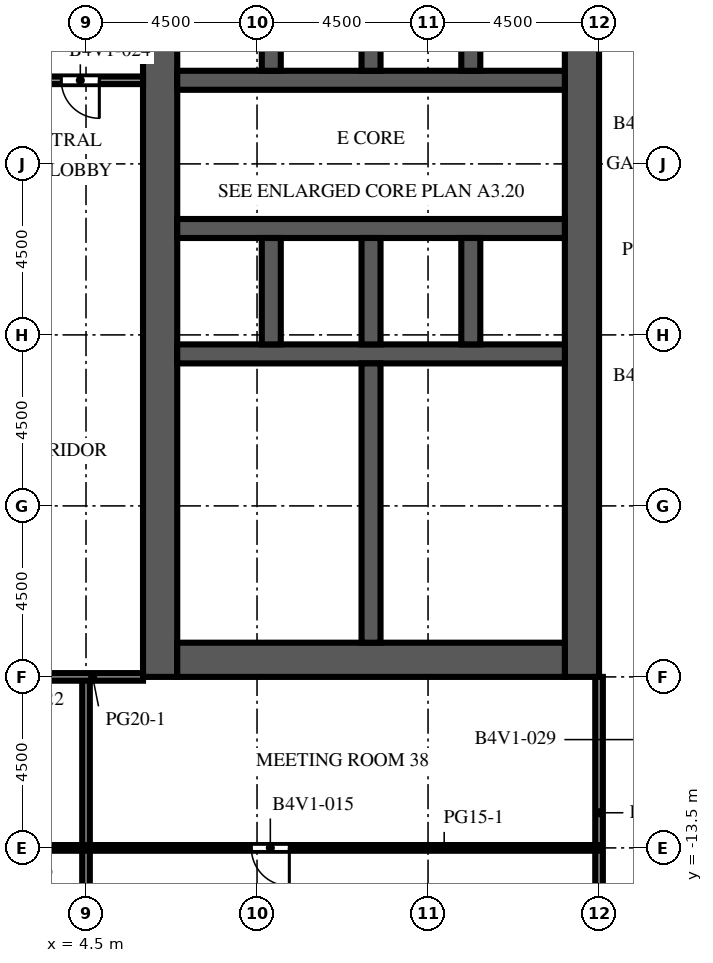
"""IFC4 building model, lengths in metres.
Left out: names, types, materials, properties, quantities, classifications, styles, units other than length and angle.
Written with IfcOpenShell. Run it as: python <this file> out.ifc"""

import sys

from ifc_helpers import new_model, si_unit, direction, frame, frame_2d, origin, place, context, subcontext, project, spatial, rectangle, extrude, element, fill, save


model = new_model("IFC4")
c1 = context("Model", 3, precision=1e-05, world=origin(), true_north=direction((0.0, 1.0)))
c2 = subcontext(c1, "Body", "Model", "MODEL_VIEW")
j1 = project(units=[si_unit("LENGTHUNIT", "METRE"), si_unit("PLANEANGLEUNIT", "RADIAN")], contexts=[c1])
p1 = place(None, origin())
s1 = spatial("IfcSite", under=j1, at=p1, CompositionType="ELEMENT")
p2 = place(p1, origin())
s2 = spatial("IfcBuilding", under=s1, at=p2, CompositionType="ELEMENT")
p3 = place(p2, frame((0.0, 0.0, 133.1)))
s3 = spatial("IfcBuildingStorey", under=s2, at=p3, CompositionType="ELEMENT", Elevation=133.1)
p4 = place(p3, frame((6.45, -9.0, 0.0), z_axis=(0.0, 0.0, 1.0), x_axis=(0.0, 1.0, 0.0)))
e1 = element("IfcWall", 1, at=p4, inside=s3, PredefinedType="SHEAR", context=c2, shape_type="SweptSolid", body=[
    extrude(rectangle(XDim=27.5, YDim=0.9, at=frame_2d((13.75, 0.0))), origin(), (0.0, 0.0, 1.0), 4.1),
])
p5 = place(p4, frame((12.55, 0.0, 0.0)))
e2 = element("IfcOpeningElement", 2, at=p5, cuts=e1, PredefinedType="OPENING", context=c2, shape_type="SweptSolid", body=[
    extrude(rectangle(XDim=2.4, YDim=2.4, at=frame_2d((1.2, 1.2))), frame((0.0, 0.46, 0.0), z_axis=(0.0, -1.0, 0.0), x_axis=(1.0, 0.0, 0.0)), (0.0, 0.0, 1.0), 0.92),
])
p6 = place(p4, frame((3.975, 0.0, 0.0)))
e3 = element("IfcOpeningElement", 3, at=p6, cuts=e1, PredefinedType="OPENING", context=c2, shape_type="SweptSolid", body=[
    extrude(rectangle(XDim=1.2, YDim=2.1, at=frame_2d((0.6, 1.05))), frame((0.0, 0.46, 0.0), z_axis=(0.0, -1.0, 0.0), x_axis=(1.0, 0.0, 0.0)), (0.0, 0.0, 1.0), 0.92),
])
p7 = place(p4, frame((22.325, 0.0, 0.0)))
e4 = element("IfcOpeningElement", 4, at=p7, cuts=e1, PredefinedType="OPENING", context=c2, shape_type="SweptSolid", body=[
    extrude(rectangle(XDim=1.2, YDim=2.1, at=frame_2d((0.6, 1.05))), frame((0.0, 0.46, 0.0), z_axis=(0.0, -1.0, 0.0), x_axis=(1.0, 0.0, 0.0)), (0.0, 0.0, 1.0), 0.92),
])
p8 = place(p3, frame((17.55, -9.0, 0.0), z_axis=(0.0, 0.0, 1.0), x_axis=(0.0, 1.0, 0.0)))
e5 = element("IfcWall", 5, at=p8, inside=s3, PredefinedType="SHEAR", context=c2, shape_type="SweptSolid", body=[
    extrude(rectangle(XDim=27.5, YDim=0.9, at=frame_2d((13.75, 0.0))), origin(), (0.0, 0.0, 1.0), 4.1),
])
p9 = place(p8, frame((12.55, 0.0, 0.0)))
e6 = element("IfcOpeningElement", 6, at=p9, cuts=e5, PredefinedType="OPENING", context=c2, shape_type="SweptSolid", body=[
    extrude(rectangle(XDim=2.4, YDim=2.4, at=frame_2d((1.2, 1.2))), frame((0.0, 0.46, 0.0), z_axis=(0.0, -1.0, 0.0), x_axis=(1.0, 0.0, 0.0)), (0.0, 0.0, 1.0), 0.92),
])
p10 = place(p8, frame((6.825, 0.0, 0.0)))
e7 = element("IfcOpeningElement", 7, at=p10, cuts=e5, PredefinedType="OPENING", context=c2, shape_type="SweptSolid", body=[
    extrude(rectangle(XDim=1.2, YDim=2.1, at=frame_2d((0.6, 1.05))), frame((0.0, 0.46, 0.0), z_axis=(0.0, -1.0, 0.0), x_axis=(1.0, 0.0, 0.0)), (0.0, 0.0, 1.0), 0.92),
])
p11 = place(p8, frame((19.475, 0.0, 0.0)))
e8 = element("IfcOpeningElement", 8, at=p11, cuts=e5, PredefinedType="OPENING", context=c2, shape_type="SweptSolid", body=[
    extrude(rectangle(XDim=1.2, YDim=2.1, at=frame_2d((0.6, 1.05))), frame((0.0, 0.46, 0.0), z_axis=(0.0, -1.0, 0.0), x_axis=(1.0, 0.0, 0.0)), (0.0, 0.0, 1.0), 0.92),
])
p12 = place(p3, frame((6.9, -8.55, 0.0), z_axis=(0.0, 0.0, 1.0), x_axis=(1.0, 0.0, 0.0)))
e9 = element("IfcWall", 9, at=p12, inside=s3, PredefinedType="SHEAR", context=c2, shape_type="SweptSolid", body=[
    extrude(rectangle(XDim=10.2, YDim=0.9, at=frame_2d((5.1, 0.0))), origin(), (0.0, 0.0, 1.0), 4.1),
])
p13 = place(p3, frame((6.9, -0.5, 0.0), z_axis=(0.0, 0.0, 1.0), x_axis=(1.0, 0.0, 0.0)))
e10 = element("IfcWall", 10, at=p13, inside=s3, PredefinedType="SHEAR", context=c2, shape_type="SweptSolid", body=[
    extrude(rectangle(XDim=10.2, YDim=0.5, at=frame_2d((5.1, 0.0))), origin(), (0.0, 0.0, 1.0), 4.1),
])
p14 = place(p3, frame((6.9, 2.8, 0.0), z_axis=(0.0, 0.0, 1.0), x_axis=(1.0, 0.0, 0.0)))
e11 = element("IfcWall", 11, at=p14, inside=s3, PredefinedType="SHEAR", context=c2, shape_type="SweptSolid", body=[
    extrude(rectangle(XDim=10.2, YDim=0.5, at=frame_2d((5.1, 0.0))), origin(), (0.0, 0.0, 1.0), 4.1),
])
p15 = place(p14, frame((0.562, 0.0, 0.0)))
e12 = element("IfcOpeningElement", 12, at=p15, cuts=e11, PredefinedType="OPENING", context=c2, shape_type="SweptSolid", body=[
    extrude(rectangle(XDim=1.1, YDim=2.1, at=frame_2d((0.55, 1.05))), frame((0.0, 0.26, 0.0), z_axis=(0.0, -1.0, 0.0), x_axis=(1.0, 0.0, 0.0)), (0.0, 0.0, 1.0), 0.52),
])
p16 = place(p14, frame((3.238, 0.0, 0.0)))
e13 = element("IfcOpeningElement", 13, at=p16, cuts=e11, PredefinedType="OPENING", context=c2, shape_type="SweptSolid", body=[
    extrude(rectangle(XDim=1.1, YDim=2.1, at=frame_2d((0.55, 1.05))), frame((0.0, 0.26, 0.0), z_axis=(0.0, -1.0, 0.0), x_axis=(1.0, 0.0, 0.0)), (0.0, 0.0, 1.0), 0.52),
])
p17 = place(p14, frame((8.538, 0.0, 0.0)))
e14 = element("IfcOpeningElement", 14, at=p17, cuts=e11, PredefinedType="OPENING", context=c2, shape_type="SweptSolid", body=[
    extrude(rectangle(XDim=1.1, YDim=2.1, at=frame_2d((0.55, 1.05))), frame((0.0, 0.26, 0.0), z_axis=(0.0, -1.0, 0.0), x_axis=(1.0, 0.0, 0.0)), (0.0, 0.0, 1.0), 0.52),
])
p18 = place(p3, frame((6.9, 6.7, 0.0), z_axis=(0.0, 0.0, 1.0), x_axis=(1.0, 0.0, 0.0)))
e15 = element("IfcWall", 15, at=p18, inside=s3, PredefinedType="SHEAR", context=c2, shape_type="SweptSolid", body=[
    extrude(rectangle(XDim=10.2, YDim=0.5, at=frame_2d((5.1, 0.0))), origin(), (0.0, 0.0, 1.0), 4.1),
])
p19 = place(p18, frame((0.562, 0.0, 0.0)))
e16 = element("IfcOpeningElement", 16, at=p19, cuts=e15, PredefinedType="OPENING", context=c2, shape_type="SweptSolid", body=[
    extrude(rectangle(XDim=1.1, YDim=2.1, at=frame_2d((0.55, 1.05))), frame((0.0, 0.26, 0.0), z_axis=(0.0, -1.0, 0.0), x_axis=(1.0, 0.0, 0.0)), (0.0, 0.0, 1.0), 0.52),
])
p20 = place(p18, frame((3.288, 0.0, 0.0)))
e17 = element("IfcOpeningElement", 17, at=p20, cuts=e15, PredefinedType="OPENING", context=c2, shape_type="SweptSolid", body=[
    extrude(rectangle(XDim=1.0, YDim=2.1, at=frame_2d((0.5, 1.05))), frame((0.0, 0.26, 0.0), z_axis=(0.0, -1.0, 0.0), x_axis=(1.0, 0.0, 0.0)), (0.0, 0.0, 1.0), 0.52),
])
p21 = place(p18, frame((5.913, 0.0, 0.0)))
e18 = element("IfcOpeningElement", 18, at=p21, cuts=e15, PredefinedType="OPENING", context=c2, shape_type="SweptSolid", body=[
    extrude(rectangle(XDim=1.0, YDim=2.1, at=frame_2d((0.5, 1.05))), frame((0.0, 0.26, 0.0), z_axis=(0.0, -1.0, 0.0), x_axis=(1.0, 0.0, 0.0)), (0.0, 0.0, 1.0), 0.52),
])
p22 = place(p18, frame((8.587, 0.0, 0.0)))
e19 = element("IfcOpeningElement", 19, at=p22, cuts=e15, PredefinedType="OPENING", context=c2, shape_type="SweptSolid", body=[
    extrude(rectangle(XDim=1.0, YDim=2.1, at=frame_2d((0.5, 1.05))), frame((0.0, 0.26, 0.0), z_axis=(0.0, -1.0, 0.0), x_axis=(1.0, 0.0, 0.0)), (0.0, 0.0, 1.0), 0.52),
])
for number, where, z_axis, x_axis in (
    (20, (9.375, -0.25, 0.0), (0.0, 0.0, 1.0), (0.0, 1.0, 0.0)),
    (21, (9.375, 6.95, 0.0), (0.0, 0.0, 1.0), (0.0, 1.0, 0.0)),
    (22, (12.0, -0.25, 0.0), (0.0, 0.0, 1.0), (0.0, 1.0, 0.0)),
    (23, (12.0, 6.95, 0.0), (0.0, 0.0, 1.0), (0.0, 1.0, 0.0)),
    (24, (14.625, -0.25, 0.0), (0.0, 0.0, 1.0), (0.0, 1.0, 0.0)),
    (25, (14.625, 6.95, 0.0), (0.0, 0.0, 1.0), (0.0, 1.0, 0.0)),
):
    element("IfcWall", number, at=place(p3, frame(where, z_axis=z_axis, x_axis=x_axis)), inside=s3, PredefinedType="SHEAR", context=c2, shape_type="SweptSolid", body=[
        extrude(rectangle(XDim=2.8, YDim=0.5, at=frame_2d((1.4, 0.0))), origin(), (0.0, 0.0, 1.0), 4.1),
    ])
p23 = place(p3, frame((12.0, -8.1, 0.0), z_axis=(0.0, 0.0, 1.0), x_axis=(0.0, 1.0, 0.0)))
e26 = element("IfcWall", 26, at=p23, inside=s3, PredefinedType="SHEAR", context=c2, shape_type="SweptSolid", body=[
    extrude(rectangle(XDim=7.35, YDim=0.5, at=frame_2d((3.675, 0.0))), origin(), (0.0, 0.0, 1.0), 4.1),
])
p24 = place(p3, frame((8.4, -8.1, 0.0), z_axis=(0.0, 0.0, 1.0), x_axis=(0.0, 1.0, 0.0)))
e27 = element("IfcWall", 27, at=p24, inside=s3, PredefinedType="PARTITIONING", context=c2, shape_type="SweptSolid", body=[
    extrude(rectangle(XDim=2.205, YDim=0.1, at=frame_2d((1.103, 0.0))), origin(), (0.0, 0.0, 1.0), 3.65),
])
p25 = place(p24, frame((0.603, 0.0, 0.0)))
e28 = element("IfcOpeningElement", 28, at=p25, cuts=e27, PredefinedType="OPENING", context=c2, shape_type="SweptSolid", body=[
    extrude(rectangle(XDim=1.0, YDim=2.1, at=frame_2d((0.5, 1.05))), frame((0.0, 0.06, 0.0), z_axis=(0.0, -1.0, 0.0), x_axis=(1.0, 0.0, 0.0)), (0.0, 0.0, 1.0), 0.12),
])
p26 = place(p3, frame((8.4, -5.895, 0.0), z_axis=(0.0, 0.0, 1.0), x_axis=(0.0, 1.0, 0.0)))
e29 = element("IfcWall", 29, at=p26, inside=s3, PredefinedType="PARTITIONING", context=c2, shape_type="SweptSolid", body=[
    extrude(rectangle(XDim=2.205, YDim=0.1, at=frame_2d((1.103, 0.0))), origin(), (0.0, 0.0, 1.0), 3.65),
])
p27 = place(p26, frame((0.603, 0.0, 0.0)))
e30 = element("IfcOpeningElement", 30, at=p27, cuts=e29, PredefinedType="OPENING", context=c2, shape_type="SweptSolid", body=[
    extrude(rectangle(XDim=1.0, YDim=2.1, at=frame_2d((0.5, 1.05))), frame((0.0, 0.06, 0.0), z_axis=(0.0, -1.0, 0.0), x_axis=(1.0, 0.0, 0.0)), (0.0, 0.0, 1.0), 0.12),
])
p28 = place(p3, frame((8.4, -3.69, 0.0), z_axis=(0.0, 0.0, 1.0), x_axis=(0.0, 1.0, 0.0)))
e31 = element("IfcWall", 31, at=p28, inside=s3, PredefinedType="PARTITIONING", context=c2, shape_type="SweptSolid", body=[
    extrude(rectangle(XDim=1.617, YDim=0.1, at=frame_2d((0.809, 0.0))), origin(), (0.0, 0.0, 1.0), 3.65),
])
p29 = place(p28, frame((0.309, 0.0, 0.0)))
e32 = element("IfcOpeningElement", 32, at=p29, cuts=e31, PredefinedType="OPENING", context=c2, shape_type="SweptSolid", body=[
    extrude(rectangle(XDim=1.0, YDim=2.1, at=frame_2d((0.5, 1.05))), frame((0.0, 0.06, 0.0), z_axis=(0.0, -1.0, 0.0), x_axis=(1.0, 0.0, 0.0)), (0.0, 0.0, 1.0), 0.12),
])
p30 = place(p3, frame((8.4, -2.073, 0.0), z_axis=(0.0, 0.0, 1.0), x_axis=(0.0, 1.0, 0.0)))
e33 = element("IfcWall", 33, at=p30, inside=s3, PredefinedType="PARTITIONING", context=c2, shape_type="SweptSolid", body=[
    extrude(rectangle(XDim=1.323, YDim=0.1, at=frame_2d((0.662, 0.0))), origin(), (0.0, 0.0, 1.0), 3.65),
])
p31 = place(p30, frame((0.2, 0.0, 0.0)))
e34 = element("IfcOpeningElement", 34, at=p31, cuts=e33, PredefinedType="OPENING", context=c2, shape_type="SweptSolid", body=[
    extrude(rectangle(XDim=0.923, YDim=2.1, at=frame_2d((0.461, 1.05))), frame((0.0, 0.06, 0.0), z_axis=(0.0, -1.0, 0.0), x_axis=(1.0, 0.0, 0.0)), (0.0, 0.0, 1.0), 0.12),
])
for number, where, z_axis, x_axis in (
    (35, (8.4, -5.895, 0.0), (0.0, 0.0, 1.0), (1.0, 0.0, 0.0)),
    (36, (8.4, -3.69, 0.0), (0.0, 0.0, 1.0), (1.0, 0.0, 0.0)),
    (37, (8.4, -2.073, 0.0), (0.0, 0.0, 1.0), (1.0, 0.0, 0.0)),
):
    element("IfcWall", number, at=place(p3, frame(where, z_axis=z_axis, x_axis=x_axis)), inside=s3, PredefinedType="PARTITIONING", context=c2, shape_type="SweptSolid", body=[
        extrude(rectangle(XDim=3.35, YDim=0.1, at=frame_2d((1.675, 0.0))), origin(), (0.0, 0.0, 1.0), 3.65),
    ])
p32 = place(p3, frame((4.5, -21.9, 0.0), z_axis=(0.0, 0.0, 1.0), x_axis=(0.0, 1.0, 0.0)))
e38 = element("IfcWall", 38, at=p32, inside=s3, PredefinedType="PARTITIONING", context=c2, shape_type="SweptSolid", body=[
    extrude(rectangle(XDim=12.9, YDim=0.2, at=frame_2d((6.45, 0.0))), origin(), (0.0, 0.0, 1.0), 3.65),
])
p33 = place(p3, frame((18.0, -17.3, 0.0), z_axis=(0.0, 0.0, 1.0), x_axis=(0.0, 1.0, 0.0)))
e39 = element("IfcWall", 39, at=p33, inside=s3, PredefinedType="PARTITIONING", context=c2, shape_type="SweptSolid", body=[
    extrude(rectangle(XDim=8.3, YDim=0.2, at=frame_2d((4.15, 0.0))), origin(), (0.0, 0.0, 1.0), 3.65),
])
p34 = place(p33, frame((0.15, 0.0, 0.0)))
e40 = element("IfcOpeningElement", 40, at=p34, cuts=e39, PredefinedType="OPENING", context=c2, shape_type="SweptSolid", body=[
    extrude(rectangle(XDim=1.0, YDim=2.1, at=frame_2d((0.5, 1.05))), frame((0.0, 0.11, 0.0), z_axis=(0.0, -1.0, 0.0), x_axis=(1.0, 0.0, 0.0)), (0.0, 0.0, 1.0), 0.22),
])
p35 = place(p3, frame((-10.5, -13.5, 0.0), z_axis=(0.0, 0.0, 1.0), x_axis=(1.0, 0.0, 0.0)))
e41 = element("IfcWall", 41, at=p35, inside=s3, PredefinedType="PARTITIONING", context=c2, shape_type="SweptSolid", body=[
    extrude(rectangle(XDim=28.5, YDim=0.15, at=frame_2d((14.25, 0.0))), origin(), (0.0, 0.0, 1.0), 3.65),
])
p36 = place(p35, frame((3.6, 0.0, 0.0)))
e42 = element("IfcOpeningElement", 42, at=p36, cuts=e41, PredefinedType="OPENING", context=c2, shape_type="SweptSolid", body=[
    extrude(rectangle(XDim=1.0, YDim=2.1, at=frame_2d((0.5, 1.05))), frame((0.0, 0.085, 0.0), z_axis=(0.0, -1.0, 0.0), x_axis=(1.0, 0.0, 0.0)), (0.0, 0.0, 1.0), 0.17),
])
p37 = place(p35, frame((12.6, 0.0, 0.0)))
e43 = element("IfcOpeningElement", 43, at=p37, cuts=e41, PredefinedType="OPENING", context=c2, shape_type="SweptSolid", body=[
    extrude(rectangle(XDim=1.0, YDim=2.1, at=frame_2d((0.5, 1.05))), frame((0.0, 0.085, 0.0), z_axis=(0.0, -1.0, 0.0), x_axis=(1.0, 0.0, 0.0)), (0.0, 0.0, 1.0), 0.17),
])
p38 = place(p35, frame((19.35, 0.0, 0.0)))
e44 = element("IfcOpeningElement", 44, at=p38, cuts=e41, PredefinedType="OPENING", context=c2, shape_type="SweptSolid", body=[
    extrude(rectangle(XDim=1.0, YDim=2.1, at=frame_2d((0.5, 1.05))), frame((0.0, 0.085, 0.0), z_axis=(0.0, -1.0, 0.0), x_axis=(1.0, 0.0, 0.0)), (0.0, 0.0, 1.0), 0.17),
])
p39 = place(p3, frame((6.0, -9.0, 0.0), z_axis=(0.0, 0.0, 1.0), x_axis=(-1.0, 0.0, 0.0)))
e45 = element("IfcWall", 45, at=p39, inside=s3, PredefinedType="PARTITIONING", context=c2, shape_type="SweptSolid", body=[
    extrude(rectangle(XDim=4.5, YDim=0.2, at=frame_2d((2.25, 0.0))), origin(), (0.0, 0.0, 1.0), 3.65),
])
p40 = place(p39, frame((2.65, 0.0, 0.0)))
e46 = element("IfcOpeningElement", 46, at=p40, cuts=e45, PredefinedType="OPENING", context=c2, shape_type="SweptSolid", body=[
    extrude(rectangle(XDim=1.0, YDim=2.1, at=frame_2d((0.5, 1.05))), frame((0.0, 0.11, 0.0), z_axis=(0.0, -1.0, 0.0), x_axis=(1.0, 0.0, 0.0)), (0.0, 0.0, 1.0), 0.22),
])
p41 = place(p3, frame((1.5, 6.7, 0.0), z_axis=(0.0, 0.0, 1.0), x_axis=(1.0, 0.0, 0.0)))
e47 = element("IfcWall", 47, at=p41, inside=s3, PredefinedType="PARTITIONING", context=c2, shape_type="SweptSolid", body=[
    extrude(rectangle(XDim=4.5, YDim=0.2, at=frame_2d((2.25, 0.0))), origin(), (0.0, 0.0, 1.0), 3.65),
])
p42 = place(p41, frame((2.35, 0.0, 0.0)))
e48 = element("IfcOpeningElement", 48, at=p42, cuts=e47, PredefinedType="OPENING", context=c2, shape_type="SweptSolid", body=[
    extrude(rectangle(XDim=1.0, YDim=2.1, at=frame_2d((0.5, 1.05))), frame((0.0, 0.11, 0.0), z_axis=(0.0, -1.0, 0.0), x_axis=(1.0, 0.0, 0.0)), (0.0, 0.0, 1.0), 0.22),
])
p43 = place(p15, origin())
e49 = element("IfcDoor", 49, at=p43, inside=s3, OperationType="DOUBLE_DOOR_SLIDING", PredefinedType="DOOR", context=c2, shape_type="SweptSolid", body=[
    extrude(rectangle(XDim=1.1, YDim=2.1, at=frame_2d((0.55, 1.05))), frame((0.0, 0.025, 0.0), z_axis=(0.0, -1.0, 0.0), x_axis=(1.0, 0.0, 0.0)), (0.0, 0.0, 1.0), 0.05),
])
fill(e12, e49)
p44 = place(p16, origin())
e50 = element("IfcDoor", 50, at=p44, inside=s3, OperationType="DOUBLE_DOOR_SLIDING", PredefinedType="DOOR", context=c2, shape_type="SweptSolid", body=[
    extrude(rectangle(XDim=1.1, YDim=2.1, at=frame_2d((0.55, 1.05))), frame((0.0, 0.025, 0.0), z_axis=(0.0, -1.0, 0.0), x_axis=(1.0, 0.0, 0.0)), (0.0, 0.0, 1.0), 0.05),
])
fill(e13, e50)
p45 = place(p17, origin())
e51 = element("IfcDoor", 51, at=p45, inside=s3, OperationType="DOUBLE_DOOR_SLIDING", PredefinedType="DOOR", context=c2, shape_type="SweptSolid", body=[
    extrude(rectangle(XDim=1.1, YDim=2.1, at=frame_2d((0.55, 1.05))), frame((0.0, 0.025, 0.0), z_axis=(0.0, -1.0, 0.0), x_axis=(1.0, 0.0, 0.0)), (0.0, 0.0, 1.0), 0.05),
])
fill(e14, e51)
p46 = place(p19, origin())
e52 = element("IfcDoor", 52, at=p46, inside=s3, OperationType="DOUBLE_DOOR_SLIDING", PredefinedType="DOOR", context=c2, shape_type="SweptSolid", body=[
    extrude(rectangle(XDim=1.1, YDim=2.1, at=frame_2d((0.55, 1.05))), frame((0.0, 0.025, 0.0), z_axis=(0.0, -1.0, 0.0), x_axis=(1.0, 0.0, 0.0)), (0.0, 0.0, 1.0), 0.05),
])
fill(e16, e52)
p47 = place(p5, origin())
e53 = element("IfcDoor", 53, at=p47, inside=s3, OperationType="DOUBLE_DOOR_DOUBLE_SWING", PredefinedType="DOOR", context=c2, shape_type="SweptSolid", body=[
    extrude(rectangle(XDim=2.4, YDim=2.4, at=frame_2d((1.2, 1.2))), frame((0.0, 0.025, 0.0), z_axis=(0.0, -1.0, 0.0), x_axis=(1.0, 0.0, 0.0)), (0.0, 0.0, 1.0), 0.05),
])
fill(e2, e53)
p48 = place(p9, origin())
e54 = element("IfcDoor", 54, at=p48, inside=s3, OperationType="DOUBLE_DOOR_DOUBLE_SWING", PredefinedType="DOOR", context=c2, shape_type="SweptSolid", body=[
    extrude(rectangle(XDim=2.4, YDim=2.4, at=frame_2d((1.2, 1.2))), frame((0.0, 0.025, 0.0), z_axis=(0.0, -1.0, 0.0), x_axis=(1.0, 0.0, 0.0)), (0.0, 0.0, 1.0), 0.05),
])
fill(e6, e54)
p49 = place(p10, frame((1.2, 0.0, 0.0), z_axis=(0.0, 0.0, 1.0), x_axis=(-1.0, 0.0, 0.0)))
e55 = element("IfcDoor", 55, at=p49, inside=s3, OperationType="SINGLE_SWING_LEFT", PredefinedType="DOOR", context=c2, shape_type="SweptSolid", body=[
    extrude(rectangle(XDim=1.2, YDim=2.1, at=frame_2d((0.6, 1.05))), frame((0.0, 0.025, 0.0), z_axis=(0.0, -1.0, 0.0), x_axis=(1.0, 0.0, 0.0)), (0.0, 0.0, 1.0), 0.05),
])
fill(e7, e55)
p50 = place(p20, origin())
e56 = element("IfcDoor", 56, at=p50, inside=s3, OperationType="SINGLE_SWING_RIGHT", PredefinedType="DOOR", context=c2, shape_type="SweptSolid", body=[
    extrude(rectangle(XDim=1.0, YDim=2.1, at=frame_2d((0.5, 1.05))), frame((0.0, 0.025, 0.0), z_axis=(0.0, -1.0, 0.0), x_axis=(1.0, 0.0, 0.0)), (0.0, 0.0, 1.0), 0.05),
])
fill(e17, e56)
p51 = place(p21, origin())
e57 = element("IfcDoor", 57, at=p51, inside=s3, OperationType="SINGLE_SWING_LEFT", PredefinedType="DOOR", context=c2, shape_type="SweptSolid", body=[
    extrude(rectangle(XDim=1.0, YDim=2.1, at=frame_2d((0.5, 1.05))), frame((0.0, 0.025, 0.0), z_axis=(0.0, -1.0, 0.0), x_axis=(1.0, 0.0, 0.0)), (0.0, 0.0, 1.0), 0.05),
])
fill(e18, e57)
p52 = place(p22, origin())
e58 = element("IfcDoor", 58, at=p52, inside=s3, OperationType="SINGLE_SWING_RIGHT", PredefinedType="DOOR", context=c2, shape_type="SweptSolid", body=[
    extrude(rectangle(XDim=1.0, YDim=2.1, at=frame_2d((0.5, 1.05))), frame((0.0, 0.025, 0.0), z_axis=(0.0, -1.0, 0.0), x_axis=(1.0, 0.0, 0.0)), (0.0, 0.0, 1.0), 0.05),
])
fill(e19, e58)
p53 = place(p6, origin())
e59 = element("IfcDoor", 59, at=p53, inside=s3, OperationType="SINGLE_SWING_RIGHT", PredefinedType="DOOR", context=c2, shape_type="SweptSolid", body=[
    extrude(rectangle(XDim=1.2, YDim=2.1, at=frame_2d((0.6, 1.05))), frame((0.0, -0.375, 0.0), z_axis=(0.0, -1.0, 0.0), x_axis=(1.0, 0.0, 0.0)), (0.0, 0.0, 1.0), 0.05),
])
fill(e3, e59)
p54 = place(p25, origin())
e60 = element("IfcDoor", 60, at=p54, inside=s3, OperationType="SINGLE_SWING_LEFT", PredefinedType="DOOR", context=c2, shape_type="SweptSolid", body=[
    extrude(rectangle(XDim=1.0, YDim=2.1, at=frame_2d((0.5, 1.05))), frame((0.0, 0.025, 0.0), z_axis=(0.0, -1.0, 0.0), x_axis=(1.0, 0.0, 0.0)), (0.0, 0.0, 1.0), 0.05),
])
fill(e28, e60)
p55 = place(p27, origin())
e61 = element("IfcDoor", 61, at=p55, inside=s3, OperationType="SINGLE_SWING_RIGHT", PredefinedType="DOOR", context=c2, shape_type="SweptSolid", body=[
    extrude(rectangle(XDim=1.0, YDim=2.1, at=frame_2d((0.5, 1.05))), frame((0.0, 0.025, 0.0), z_axis=(0.0, -1.0, 0.0), x_axis=(1.0, 0.0, 0.0)), (0.0, 0.0, 1.0), 0.05),
])
fill(e30, e61)
p56 = place(p29, origin())
e62 = element("IfcDoor", 62, at=p56, inside=s3, OperationType="SINGLE_SWING_LEFT", PredefinedType="DOOR", context=c2, shape_type="SweptSolid", body=[
    extrude(rectangle(XDim=1.0, YDim=2.1, at=frame_2d((0.5, 1.05))), frame((0.0, 0.025, 0.0), z_axis=(0.0, -1.0, 0.0), x_axis=(1.0, 0.0, 0.0)), (0.0, 0.0, 1.0), 0.05),
])
fill(e32, e62)
p57 = place(p31, origin())
e63 = element("IfcDoor", 63, at=p57, inside=s3, OperationType="SINGLE_SWING_RIGHT", PredefinedType="DOOR", context=c2, shape_type="SweptSolid", body=[
    extrude(rectangle(XDim=0.923, YDim=2.1, at=frame_2d((0.461, 1.05))), frame((0.0, 0.025, 0.0), z_axis=(0.0, -1.0, 0.0), x_axis=(1.0, 0.0, 0.0)), (0.0, 0.0, 1.0), 0.05),
])
fill(e34, e63)
p58 = place(p38, origin())
e64 = element("IfcDoor", 64, at=p58, inside=s3, OperationType="SINGLE_SWING_RIGHT", PredefinedType="DOOR", context=c2, shape_type="SweptSolid", body=[
    extrude(rectangle(XDim=1.0, YDim=2.1, at=frame_2d((0.5, 1.05))), frame((0.0, 0.025, 0.0), z_axis=(0.0, -1.0, 0.0), x_axis=(1.0, 0.0, 0.0)), (0.0, 0.0, 1.0), 0.05),
])
fill(e44, e64)
p59 = place(p42, origin())
e65 = element("IfcDoor", 65, at=p59, inside=s3, OperationType="SINGLE_SWING_RIGHT", PredefinedType="DOOR", context=c2, shape_type="SweptSolid", body=[
    extrude(rectangle(XDim=1.0, YDim=2.1, at=frame_2d((0.5, 1.05))), frame((0.0, 0.025, 0.0), z_axis=(0.0, -1.0, 0.0), x_axis=(1.0, 0.0, 0.0)), (0.0, 0.0, 1.0), 0.05),
])
fill(e48, e65)
save(model, sys.argv[1])
